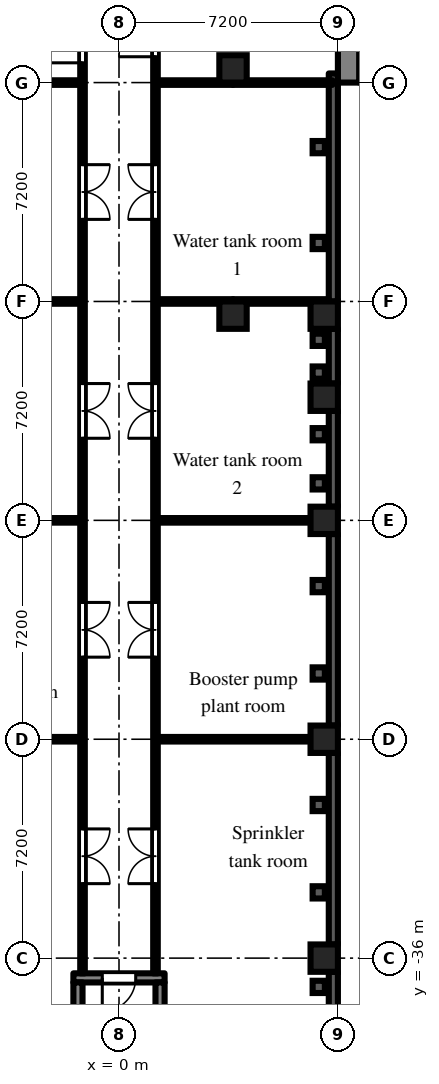
"""IFC4 building model, lengths in metres.
Left out: names, types, materials, properties, quantities, classifications, styles, units other than length and angle.
Written with IfcOpenShell. Run it as: python <this file> out.ifc"""

import sys

from ifc_helpers import new_model, si_unit, direction, frame, frame_2d, origin, origin_2d, place, context, subcontext, project, spatial, rectangle, extrude, element, fill, save


model = new_model("IFC4")
c1 = context("Model", 3, precision=1e-05, world=origin(), true_north=direction((0.0, 1.0)))
c2 = subcontext(c1, "Body", "Model", "MODEL_VIEW")
j1 = project(units=[si_unit("LENGTHUNIT", "METRE"), si_unit("PLANEANGLEUNIT", "RADIAN")], contexts=[c1])
p1 = place(None, origin())
s1 = spatial("IfcSite", under=j1, at=p1, CompositionType="ELEMENT")
p2 = place(p1, origin())
s2 = spatial("IfcBuilding", under=s1, at=p2, CompositionType="ELEMENT")
p3 = place(p2, frame((0.0, 0.0, 62.7)))
s3 = spatial("IfcBuildingStorey", under=s2, at=p3, CompositionType="ELEMENT", Elevation=62.7)
for number, where, z_axis, x_axis in (
    (1, (3.75, -14.85, 0.0), (0.0, 0.0, 1.0), (1.0, 0.0, 0.0)),
    (2, (3.75, -6.75, 0.0), (0.0, 0.0, 1.0), (1.0, 0.0, 0.0)),
    (3, (6.75, -36.0, 0.0), (0.0, 0.0, 1.0), (1.0, 0.0, 0.0)),
    (4, (6.75, -28.8, 0.0), (0.0, 0.0, 1.0), (1.0, 0.0, 0.0)),
    (5, (6.75, -21.6, 0.0), (0.0, 0.0, 1.0), (1.0, 0.0, 0.0)),
    (6, (6.75, -17.55, 0.0), (0.0, 0.0, 1.0), (1.0, 0.0, 0.0)),
    (7, (6.75, -14.85, 0.0), (0.0, 0.0, 1.0), (1.0, 0.0, 0.0)),
):
    element("IfcColumn", number, at=place(p3, frame(where, z_axis=z_axis, x_axis=x_axis)), inside=s3, PredefinedType="COLUMN", context=c2, shape_type="SweptSolid", body=[
        extrude(rectangle(XDim=0.9, YDim=0.9, at=origin_2d()), origin(), (0.0, 0.0, 1.0), 4.2),
    ])
p4 = place(p3, frame((7.05, -38.7, 0.0), z_axis=(0.0, 0.0, 1.0), x_axis=(0.0, 1.0, 0.0)))
e8 = element("IfcWall", 8, at=p4, inside=s3, PredefinedType="SOLIDWALL", context=c2, shape_type="SweptSolid", body=[
    extrude(rectangle(XDim=2.25, YDim=0.3, at=frame_2d((1.125, 0.0))), origin(), (0.0, 0.0, 1.0), 3.3),
])
for number, where, z_axis, x_axis in (
    (9, (7.05, -35.55, 0.0), (0.0, 0.0, 1.0), (0.0, 1.0, 0.0)),
    (10, (7.05, -28.35, 0.0), (0.0, 0.0, 1.0), (0.0, 1.0, 0.0)),
):
    element("IfcWall", number, at=place(p3, frame(where, z_axis=z_axis, x_axis=x_axis)), inside=s3, PredefinedType="SOLIDWALL", context=c2, shape_type="SweptSolid", body=[
        extrude(rectangle(XDim=6.3, YDim=0.3, at=frame_2d((3.15, 0.0))), origin(), (0.0, 0.0, 1.0), 3.3),
    ])
p5 = place(p3, frame((7.05, -21.15, 0.0), z_axis=(0.0, 0.0, 1.0), x_axis=(0.0, 1.0, 0.0)))
e11 = element("IfcWall", 11, at=p5, inside=s3, PredefinedType="SOLIDWALL", context=c2, shape_type="SweptSolid", body=[
    extrude(rectangle(XDim=3.15, YDim=0.3, at=frame_2d((1.575, 0.0))), origin(), (0.0, 0.0, 1.0), 3.3),
])
p6 = place(p3, frame((7.05, -17.1, 0.0), z_axis=(0.0, 0.0, 1.0), x_axis=(0.0, 1.0, 0.0)))
e12 = element("IfcWall", 12, at=p6, inside=s3, PredefinedType="SOLIDWALL", context=c2, shape_type="SweptSolid", body=[
    extrude(rectangle(XDim=1.8, YDim=0.3, at=frame_2d((0.9, 0.0))), origin(), (0.0, 0.0, 1.0), 3.3),
])
p7 = place(p3, frame((7.05, -14.4, 0.0), z_axis=(0.0, 0.0, 1.0), x_axis=(0.0, 1.0, 0.0)))
e13 = element("IfcWall", 13, at=p7, inside=s3, PredefinedType="SOLIDWALL", context=c2, shape_type="SweptSolid", body=[
    extrude(rectangle(XDim=7.5, YDim=0.3, at=frame_2d((3.75, 0.0))), origin(), (0.0, 0.0, 1.0), 3.775),
])
p8 = place(p3, frame((7.55, -7.2, 0.0), z_axis=(0.0, 0.0, 1.0), x_axis=(0.0, 1.0, 0.0)))
e14 = element("IfcWall", 14, at=p8, inside=s3, PredefinedType="SHEAR", context=c2, shape_type="SweptSolid", body=[
    extrude(rectangle(XDim=14.4, YDim=0.7, at=frame_2d((7.2, 0.0))), origin(), (0.0, 0.0, 1.0), 3.775),
])
p9 = place(p8, frame((6.0, 0.0, 0.0)))
e15 = element("IfcOpeningElement", 15, at=p9, cuts=e14, PredefinedType="OPENING", context=c2, shape_type="SweptSolid", body=[
    extrude(rectangle(XDim=2.4, YDim=2.2, at=frame_2d((1.2, 1.1))), frame((0.0, 0.36, 0.0), z_axis=(0.0, -1.0, 0.0), x_axis=(1.0, 0.0, 0.0)), (0.0, 0.0, 1.0), 0.72),
])
p10 = place(p3, frame((-1.5, -36.65, 0.0), z_axis=(0.0, 0.0, 1.0), x_axis=(1.0, 0.0, 0.0)))
e16 = element("IfcWall", 16, at=p10, inside=s3, PredefinedType="SHEAR", context=c2, shape_type="SweptSolid", body=[
    extrude(rectangle(XDim=3.0, YDim=0.3, at=frame_2d((1.5, 0.0))), origin(), (0.0, 0.0, 1.0), 3.775),
])
p11 = place(p10, frame((0.95, 0.0, 0.0)))
e17 = element("IfcOpeningElement", 17, at=p11, cuts=e16, PredefinedType="OPENING", context=c2, shape_type="SweptSolid", body=[
    extrude(rectangle(XDim=1.1, YDim=2.1, at=frame_2d((0.55, 1.05))), frame((0.0, 0.16, 0.0), z_axis=(0.0, -1.0, 0.0), x_axis=(1.0, 0.0, 0.0)), (0.0, 0.0, 1.0), 0.32),
])
for number, where, z_axis, x_axis in (
    (18, (-1.35, -36.8, 0.0), (0.0, 0.0, 1.0), (0.0, -1.0, 0.0)),
    (19, (1.35, -36.8, 0.0), (0.0, 0.0, 1.0), (0.0, -1.0, 0.0)),
):
    element("IfcWall", number, at=place(p3, frame(where, z_axis=z_axis, x_axis=x_axis)), inside=s3, PredefinedType="SHEAR", context=c2, shape_type="SweptSolid", body=[
        extrude(rectangle(XDim=5.8, YDim=0.3, at=frame_2d((2.9, 0.0))), origin(), (0.0, 0.0, 1.0), 3.775),
    ])
for number, where, z_axis, x_axis in (
    (20, (-6.9, -28.8, 0.0), (0.0, 0.0, 1.0), (1.0, 0.0, 0.0)),
    (21, (-6.9, -21.6, 0.0), (0.0, 0.0, 1.0), (1.0, 0.0, 0.0)),
):
    element("IfcWall", number, at=place(p3, frame(where, z_axis=z_axis, x_axis=x_axis)), inside=s3, PredefinedType="PARTITIONING", context=c2, shape_type="SweptSolid", body=[
        extrude(rectangle(XDim=5.625, YDim=0.15, at=frame_2d((2.812, 0.0))), origin(), (0.0, 0.0, 1.0), 3.775),
    ])
p12 = place(p3, frame((-1.2, -36.5, 0.0), z_axis=(0.0, 0.0, 1.0), x_axis=(0.0, 1.0, 0.0)))
e22 = element("IfcWall", 22, at=p12, inside=s3, PredefinedType="PARTITIONING", context=c2, shape_type="SweptSolid", body=[
    extrude(rectangle(XDim=35.375, YDim=0.15, at=frame_2d((17.688, 0.0))), origin(), (0.0, 0.0, 1.0), 3.775),
])
p13 = place(p12, frame((29.95, 0.0, 0.0)))
e23 = element("IfcOpeningElement", 23, at=p13, cuts=e22, PredefinedType="OPENING", context=c2, shape_type="SweptSolid", body=[
    extrude(rectangle(XDim=1.2, YDim=2.1, at=frame_2d((0.6, 1.05))), frame((0.0, 0.085, 0.0), z_axis=(0.0, -1.0, 0.0), x_axis=(1.0, 0.0, 0.0)), (0.0, 0.0, 1.0), 0.17),
])
p14 = place(p12, frame((34.3, 0.0, 0.0)))
e24 = element("IfcOpeningElement", 24, at=p14, cuts=e22, PredefinedType="OPENING", context=c2, shape_type="SweptSolid", body=[
    extrude(rectangle(XDim=0.9, YDim=2.1, at=frame_2d((0.45, 1.05))), frame((0.0, 0.085, 0.0), z_axis=(0.0, -1.0, 0.0), x_axis=(1.0, 0.0, 0.0)), (0.0, 0.0, 1.0), 0.17),
])
p15 = place(p12, frame((24.8, 0.0, 0.0)))
e25 = element("IfcOpeningElement", 25, at=p15, cuts=e22, PredefinedType="OPENING", context=c2, shape_type="SweptSolid", body=[
    extrude(rectangle(XDim=1.8, YDim=2.1, at=frame_2d((0.9, 1.05))), frame((0.0, 0.085, 0.0), z_axis=(0.0, -1.0, 0.0), x_axis=(1.0, 0.0, 0.0)), (0.0, 0.0, 1.0), 0.17),
])
p16 = place(p12, frame((17.6, 0.0, 0.0)))
e26 = element("IfcOpeningElement", 26, at=p16, cuts=e22, PredefinedType="OPENING", context=c2, shape_type="SweptSolid", body=[
    extrude(rectangle(XDim=1.8, YDim=2.1, at=frame_2d((0.9, 1.05))), frame((0.0, 0.085, 0.0), z_axis=(0.0, -1.0, 0.0), x_axis=(1.0, 0.0, 0.0)), (0.0, 0.0, 1.0), 0.17),
])
p17 = place(p12, frame((10.4, 0.0, 0.0)))
e27 = element("IfcOpeningElement", 27, at=p17, cuts=e22, PredefinedType="OPENING", context=c2, shape_type="SweptSolid", body=[
    extrude(rectangle(XDim=1.8, YDim=2.1, at=frame_2d((0.9, 1.05))), frame((0.0, 0.085, 0.0), z_axis=(0.0, -1.0, 0.0), x_axis=(1.0, 0.0, 0.0)), (0.0, 0.0, 1.0), 0.17),
])
p18 = place(p12, frame((2.95, 0.0, 0.0)))
e28 = element("IfcOpeningElement", 28, at=p18, cuts=e22, PredefinedType="OPENING", context=c2, shape_type="SweptSolid", body=[
    extrude(rectangle(XDim=1.8, YDim=2.1, at=frame_2d((0.9, 1.05))), frame((0.0, 0.085, 0.0), z_axis=(0.0, -1.0, 0.0), x_axis=(1.0, 0.0, 0.0)), (0.0, 0.0, 1.0), 0.17),
])
p19 = place(p3, frame((1.2, -36.5, 0.0), z_axis=(0.0, 0.0, 1.0), x_axis=(0.0, 1.0, 0.0)))
e29 = element("IfcWall", 29, at=p19, inside=s3, PredefinedType="PARTITIONING", context=c2, shape_type="SweptSolid", body=[
    extrude(rectangle(XDim=35.375, YDim=0.15, at=frame_2d((17.688, 0.0))), origin(), (0.0, 0.0, 1.0), 3.775),
])
p20 = place(p19, frame((30.15, 0.0, 0.0)))
e30 = element("IfcOpeningElement", 30, at=p20, cuts=e29, PredefinedType="OPENING", context=c2, shape_type="SweptSolid", body=[
    extrude(rectangle(XDim=1.2, YDim=2.1, at=frame_2d((0.6, 1.05))), frame((0.0, 0.085, 0.0), z_axis=(0.0, -1.0, 0.0), x_axis=(1.0, 0.0, 0.0)), (0.0, 0.0, 1.0), 0.17),
])
p21 = place(p19, frame((24.8, 0.0, 0.0)))
e31 = element("IfcOpeningElement", 31, at=p21, cuts=e29, PredefinedType="OPENING", context=c2, shape_type="SweptSolid", body=[
    extrude(rectangle(XDim=1.8, YDim=2.1, at=frame_2d((0.9, 1.05))), frame((0.0, 0.085, 0.0), z_axis=(0.0, -1.0, 0.0), x_axis=(1.0, 0.0, 0.0)), (0.0, 0.0, 1.0), 0.17),
])
p22 = place(p19, frame((17.6, 0.0, 0.0)))
e32 = element("IfcOpeningElement", 32, at=p22, cuts=e29, PredefinedType="OPENING", context=c2, shape_type="SweptSolid", body=[
    extrude(rectangle(XDim=1.8, YDim=2.1, at=frame_2d((0.9, 1.05))), frame((0.0, 0.085, 0.0), z_axis=(0.0, -1.0, 0.0), x_axis=(1.0, 0.0, 0.0)), (0.0, 0.0, 1.0), 0.17),
])
p23 = place(p19, frame((10.4, 0.0, 0.0)))
e33 = element("IfcOpeningElement", 33, at=p23, cuts=e29, PredefinedType="OPENING", context=c2, shape_type="SweptSolid", body=[
    extrude(rectangle(XDim=1.8, YDim=2.1, at=frame_2d((0.9, 1.05))), frame((0.0, 0.085, 0.0), z_axis=(0.0, -1.0, 0.0), x_axis=(1.0, 0.0, 0.0)), (0.0, 0.0, 1.0), 0.17),
])
p24 = place(p19, frame((2.95, 0.0, 0.0)))
e34 = element("IfcOpeningElement", 34, at=p24, cuts=e29, PredefinedType="OPENING", context=c2, shape_type="SweptSolid", body=[
    extrude(rectangle(XDim=1.8, YDim=2.1, at=frame_2d((0.9, 1.05))), frame((0.0, 0.085, 0.0), z_axis=(0.0, -1.0, 0.0), x_axis=(1.0, 0.0, 0.0)), (0.0, 0.0, 1.0), 0.17),
])
for number, where, z_axis, x_axis in (
    (35, (1.275, -28.8, 0.0), (0.0, 0.0, 1.0), (1.0, 0.0, 0.0)),
    (36, (1.275, -21.6, 0.0), (0.0, 0.0, 1.0), (1.0, 0.0, 0.0)),
):
    element("IfcWall", number, at=place(p3, frame(where, z_axis=z_axis, x_axis=x_axis)), inside=s3, PredefinedType="PARTITIONING", context=c2, shape_type="SweptSolid", body=[
        extrude(rectangle(XDim=5.625, YDim=0.15, at=frame_2d((2.812, 0.0))), origin(), (0.0, 0.0, 1.0), 3.775),
    ])
for number, where, z_axis, x_axis in (
    (37, (1.275, -14.4, 0.0), (0.0, 0.0, 1.0), (1.0, 0.0, 0.0)),
    (38, (1.275, -7.2, 0.0), (0.0, 0.0, 1.0), (1.0, 0.0, 0.0)),
    (39, (-3.75, -14.4, 0.0), (0.0, 0.0, 1.0), (1.0, 0.0, 0.0)),
    (40, (-3.75, -7.2, 0.0), (0.0, 0.0, 1.0), (1.0, 0.0, 0.0)),
):
    element("IfcWall", number, at=place(p3, frame(where, z_axis=z_axis, x_axis=x_axis)), inside=s3, PredefinedType="PARTITIONING", context=c2, shape_type="SweptSolid", body=[
        extrude(rectangle(XDim=2.475, YDim=0.15, at=frame_2d((1.238, 0.0))), origin(), (0.0, 0.0, 1.0), 3.775),
    ])
p25 = place(p3, frame((3.75, -14.4, 0.0), z_axis=(0.0, 0.0, 1.0), x_axis=(1.0, 0.0, 0.0)))
e41 = element("IfcWall", 41, at=p25, inside=s3, PredefinedType="PARTITIONING", context=c2, shape_type="SweptSolid", body=[
    extrude(rectangle(XDim=3.15, YDim=0.15, at=frame_2d((1.575, 0.0))), origin(), (0.0, 0.0, 1.0), 3.3),
])
p26 = place(p3, frame((3.75, -7.2, 0.0), z_axis=(0.0, 0.0, 1.0), x_axis=(1.0, 0.0, 0.0)))
e42 = element("IfcWall", 42, at=p26, inside=s3, PredefinedType="PARTITIONING", context=c2, shape_type="SweptSolid", body=[
    extrude(rectangle(XDim=3.27, YDim=0.15, at=frame_2d((1.635, 0.0))), origin(), (0.0, 0.0, 1.0), 3.3),
])
p27 = place(p11, frame((1.1, 0.0, 0.0), z_axis=(0.0, 0.0, 1.0), x_axis=(-1.0, 0.0, 0.0)))
e43 = element("IfcDoor", 43, at=p27, inside=s3, OperationType="SINGLE_SWING_RIGHT", PredefinedType="DOOR", context=c2, shape_type="SweptSolid", body=[
    extrude(rectangle(XDim=1.1, YDim=2.1, at=frame_2d((0.55, 1.05))), frame((0.0, 0.025, 0.0), z_axis=(0.0, -1.0, 0.0), x_axis=(1.0, 0.0, 0.0)), (0.0, 0.0, 1.0), 0.05),
])
fill(e17, e43)
p28 = place(p13, origin())
e44 = element("IfcDoor", 44, at=p28, inside=s3, OperationType="SINGLE_SWING_LEFT", PredefinedType="DOOR", context=c2, shape_type="SweptSolid", body=[
    extrude(rectangle(XDim=1.2, YDim=2.1, at=frame_2d((0.6, 1.05))), frame((0.0, 0.025, 0.0), z_axis=(0.0, -1.0, 0.0), x_axis=(1.0, 0.0, 0.0)), (0.0, 0.0, 1.0), 0.05),
])
fill(e23, e44)
p29 = place(p20, origin())
e45 = element("IfcDoor", 45, at=p29, inside=s3, OperationType="SINGLE_SWING_LEFT", PredefinedType="DOOR", context=c2, shape_type="SweptSolid", body=[
    extrude(rectangle(XDim=1.2, YDim=2.1, at=frame_2d((0.6, 1.05))), frame((0.0, 0.025, 0.0), z_axis=(0.0, -1.0, 0.0), x_axis=(1.0, 0.0, 0.0)), (0.0, 0.0, 1.0), 0.05),
])
fill(e30, e45)
p30 = place(p21, origin())
e46 = element("IfcDoor", 46, at=p30, inside=s3, OperationType="DOUBLE_DOOR_DOUBLE_SWING", PredefinedType="DOOR", context=c2, shape_type="SweptSolid", body=[
    extrude(rectangle(XDim=1.8, YDim=2.1, at=frame_2d((0.9, 1.05))), frame((0.0, 0.025, 0.0), z_axis=(0.0, -1.0, 0.0), x_axis=(1.0, 0.0, 0.0)), (0.0, 0.0, 1.0), 0.05),
])
fill(e31, e46)
p31 = place(p22, origin())
e47 = element("IfcDoor", 47, at=p31, inside=s3, OperationType="DOUBLE_DOOR_DOUBLE_SWING", PredefinedType="DOOR", context=c2, shape_type="SweptSolid", body=[
    extrude(rectangle(XDim=1.8, YDim=2.1, at=frame_2d((0.9, 1.05))), frame((0.0, 0.025, 0.0), z_axis=(0.0, -1.0, 0.0), x_axis=(1.0, 0.0, 0.0)), (0.0, 0.0, 1.0), 0.05),
])
fill(e32, e47)
p32 = place(p23, origin())
e48 = element("IfcDoor", 48, at=p32, inside=s3, OperationType="DOUBLE_DOOR_DOUBLE_SWING", PredefinedType="DOOR", context=c2, shape_type="SweptSolid", body=[
    extrude(rectangle(XDim=1.8, YDim=2.1, at=frame_2d((0.9, 1.05))), frame((0.0, 0.025, 0.0), z_axis=(0.0, -1.0, 0.0), x_axis=(1.0, 0.0, 0.0)), (0.0, 0.0, 1.0), 0.05),
])
fill(e33, e48)
p33 = place(p24, origin())
e49 = element("IfcDoor", 49, at=p33, inside=s3, OperationType="DOUBLE_DOOR_DOUBLE_SWING", PredefinedType="DOOR", context=c2, shape_type="SweptSolid", body=[
    extrude(rectangle(XDim=1.8, YDim=2.1, at=frame_2d((0.9, 1.05))), frame((0.0, 0.025, 0.0), z_axis=(0.0, -1.0, 0.0), x_axis=(1.0, 0.0, 0.0)), (0.0, 0.0, 1.0), 0.05),
])
fill(e34, e49)
p34 = place(p15, frame((1.8, 0.0, 0.0), z_axis=(0.0, 0.0, 1.0), x_axis=(-1.0, 0.0, 0.0)))
e50 = element("IfcDoor", 50, at=p34, inside=s3, OperationType="DOUBLE_DOOR_DOUBLE_SWING", PredefinedType="DOOR", context=c2, shape_type="SweptSolid", body=[
    extrude(rectangle(XDim=1.8, YDim=2.1, at=frame_2d((0.9, 1.05))), frame((0.0, 0.025, 0.0), z_axis=(0.0, -1.0, 0.0), x_axis=(1.0, 0.0, 0.0)), (0.0, 0.0, 1.0), 0.05),
])
fill(e25, e50)
p35 = place(p16, frame((1.8, 0.0, 0.0), z_axis=(0.0, 0.0, 1.0), x_axis=(-1.0, 0.0, 0.0)))
e51 = element("IfcDoor", 51, at=p35, inside=s3, OperationType="DOUBLE_DOOR_DOUBLE_SWING", PredefinedType="DOOR", context=c2, shape_type="SweptSolid", body=[
    extrude(rectangle(XDim=1.8, YDim=2.1, at=frame_2d((0.9, 1.05))), frame((0.0, 0.025, 0.0), z_axis=(0.0, -1.0, 0.0), x_axis=(1.0, 0.0, 0.0)), (0.0, 0.0, 1.0), 0.05),
])
fill(e26, e51)
p36 = place(p17, frame((1.8, 0.0, 0.0), z_axis=(0.0, 0.0, 1.0), x_axis=(-1.0, 0.0, 0.0)))
e52 = element("IfcDoor", 52, at=p36, inside=s3, OperationType="DOUBLE_DOOR_DOUBLE_SWING", PredefinedType="DOOR", context=c2, shape_type="SweptSolid", body=[
    extrude(rectangle(XDim=1.8, YDim=2.1, at=frame_2d((0.9, 1.05))), frame((0.0, 0.025, 0.0), z_axis=(0.0, -1.0, 0.0), x_axis=(1.0, 0.0, 0.0)), (0.0, 0.0, 1.0), 0.05),
])
fill(e27, e52)
p37 = place(p18, frame((1.8, 0.0, 0.0), z_axis=(0.0, 0.0, 1.0), x_axis=(-1.0, 0.0, 0.0)))
e53 = element("IfcDoor", 53, at=p37, inside=s3, OperationType="DOUBLE_DOOR_DOUBLE_SWING", PredefinedType="DOOR", context=c2, shape_type="SweptSolid", body=[
    extrude(rectangle(XDim=1.8, YDim=2.1, at=frame_2d((0.9, 1.05))), frame((0.0, 0.025, 0.0), z_axis=(0.0, -1.0, 0.0), x_axis=(1.0, 0.0, 0.0)), (0.0, 0.0, 1.0), 0.05),
])
fill(e28, e53)
save(model, sys.argv[1])
